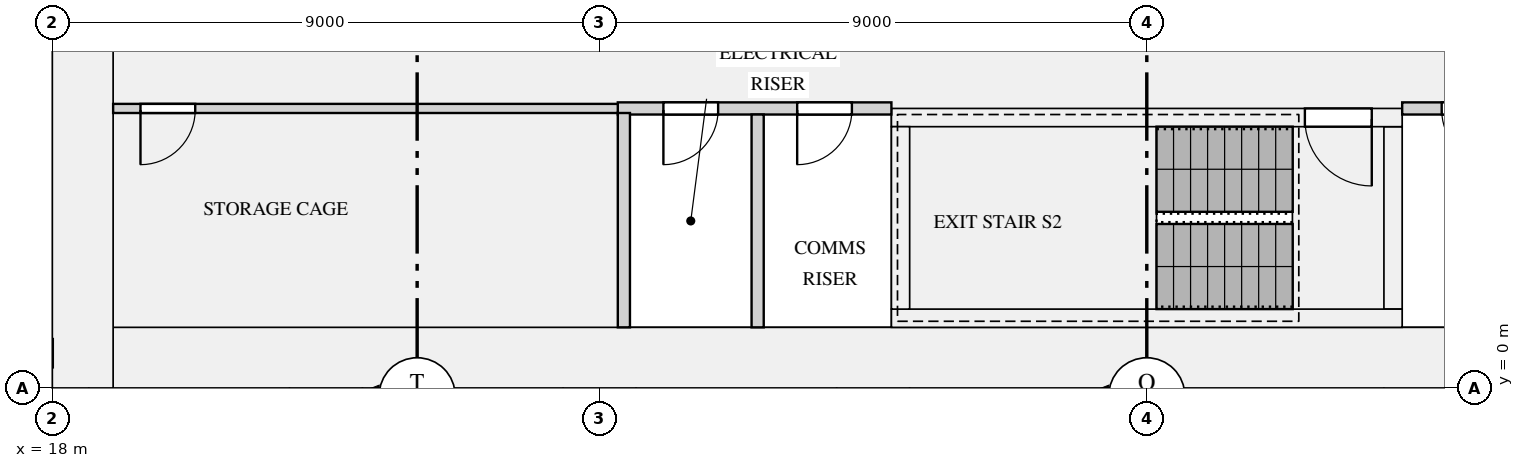
"""IFC4 building model, lengths in metres.
Left out: names, types, materials, properties, quantities, classifications, styles, units other than length and angle.
Written with IfcOpenShell. Run it as: python <this file> out.ifc"""

import sys

from ifc_helpers import new_model, si_unit, direction, frame, frame_2d, origin, place, context, subcontext, project, spatial, rectangle, extrude, element, fill, save


model = new_model("IFC4")
c1 = context("Model", 3, precision=1e-05, world=origin(), true_north=direction((0.0, 1.0)))
c2 = subcontext(c1, "Body", "Model", "MODEL_VIEW")
j1 = project(units=[si_unit("LENGTHUNIT", "METRE"), si_unit("PLANEANGLEUNIT", "RADIAN")], contexts=[c1])
p1 = place(None, origin())
s1 = spatial("IfcSite", under=j1, at=p1, CompositionType="ELEMENT")
p2 = place(p1, origin())
s2 = spatial("IfcBuilding", under=s1, at=p2, CompositionType="ELEMENT")
p3 = place(p2, frame((0.0, 0.0, 60.45)))
s3 = spatial("IfcBuildingStorey", under=s2, at=p3, CompositionType="ELEMENT", Elevation=60.45)
p4 = place(p3, frame((18.5, 0.0, 0.0), z_axis=(0.0, 0.0, 1.0), x_axis=(0.0, 1.0, 0.0)))
e1 = element("IfcWall", 1, at=p4, inside=s3, PredefinedType="SHEAR", context=c2, shape_type="SweptSolid", body=[
    extrude(rectangle(XDim=12.5, YDim=1.0, at=frame_2d((6.25, 0.0))), origin(), (0.0, 0.0, 1.0), 3.15),
])
p5 = place(p3, frame((19.0, 0.5, 0.0), z_axis=(0.0, 0.0, 1.0), x_axis=(1.0, 0.0, 0.0)))
e2 = element("IfcWall", 2, at=p5, inside=s3, PredefinedType="SHEAR", context=c2, shape_type="SweptSolid", body=[
    extrude(rectangle(XDim=34.0, YDim=1.0, at=frame_2d((17.0, 0.0))), origin(), (0.0, 0.0, 1.0), 3.15),
])
p6 = place(p3, frame((31.8, 1.15, 0.0), z_axis=(0.0, 0.0, 1.0), x_axis=(1.0, 0.0, 0.0)))
e3 = element("IfcWall", 3, at=p6, inside=s3, PredefinedType="SHEAR", context=c2, shape_type="SweptSolid", body=[
    extrude(rectangle(XDim=8.4, YDim=0.3, at=frame_2d((4.2, 0.0))), origin(), (0.0, 0.0, 1.0), 3.15),
])
p7 = place(p3, frame((31.8, 4.45, 0.0), z_axis=(0.0, 0.0, 1.0), x_axis=(1.0, 0.0, 0.0)))
e4 = element("IfcWall", 4, at=p7, inside=s3, PredefinedType="SHEAR", context=c2, shape_type="SweptSolid", body=[
    extrude(rectangle(XDim=8.4, YDim=0.3, at=frame_2d((4.2, 0.0))), origin(), (0.0, 0.0, 1.0), 3.15),
])
p8 = place(p7, frame((6.8, 0.0, 0.0)))
e5 = element("IfcOpeningElement", 5, at=p8, cuts=e4, PredefinedType="OPENING", context=c2, shape_type="SweptSolid", body=[
    extrude(rectangle(XDim=1.1, YDim=2.1, at=frame_2d((0.55, 1.05))), frame((0.0, 0.16, 0.0), z_axis=(0.0, -1.0, 0.0), x_axis=(1.0, 0.0, 0.0)), (0.0, 0.0, 1.0), 0.32),
])
for number, where, z_axis, x_axis in (
    (6, (31.95, 1.3, 0.0), (0.0, 0.0, 1.0), (0.0, 1.0, 0.0)),
    (7, (40.05, 1.3, 0.0), (0.0, 0.0, 1.0), (0.0, 1.0, 0.0)),
):
    element("IfcWall", number, at=place(p3, frame(where, z_axis=z_axis, x_axis=x_axis)), inside=s3, PredefinedType="SHEAR", context=c2, shape_type="SweptSolid", body=[
        extrude(rectangle(XDim=3.0, YDim=0.3, at=frame_2d((1.5, 0.0))), origin(), (0.0, 0.0, 1.0), 3.15),
    ])
p9 = place(p3, frame((27.3, 4.6, 0.0), z_axis=(0.0, 0.0, 1.0), x_axis=(1.0, 0.0, 0.0)))
e8 = element("IfcWall", 8, at=p9, inside=s3, PredefinedType="PARTITIONING", context=c2, shape_type="SweptSolid", body=[
    extrude(rectangle(XDim=4.5, YDim=0.2, at=frame_2d((2.25, 0.0))), origin(), (0.0, 0.0, 1.0), 2.83),
])
p10 = place(p9, frame((0.75, 0.0, 0.0)))
e9 = element("IfcOpeningElement", 9, at=p10, cuts=e8, PredefinedType="OPENING", context=c2, shape_type="SweptSolid", body=[
    extrude(rectangle(XDim=0.9, YDim=2.1, at=frame_2d((0.45, 1.05))), frame((0.0, 0.11, 0.0), z_axis=(0.0, -1.0, 0.0), x_axis=(1.0, 0.0, 0.0)), (0.0, 0.0, 1.0), 0.22),
])
p11 = place(p9, frame((2.95, 0.0, 0.0)))
e10 = element("IfcOpeningElement", 10, at=p11, cuts=e8, PredefinedType="OPENING", context=c2, shape_type="SweptSolid", body=[
    extrude(rectangle(XDim=0.9, YDim=2.1, at=frame_2d((0.45, 1.05))), frame((0.0, 0.11, 0.0), z_axis=(0.0, -1.0, 0.0), x_axis=(1.0, 0.0, 0.0)), (0.0, 0.0, 1.0), 0.22),
])
p12 = place(p3, frame((40.2, 4.6, 0.0), z_axis=(0.0, 0.0, 1.0), x_axis=(1.0, 0.0, 0.0)))
e11 = element("IfcWall", 11, at=p12, inside=s3, PredefinedType="PARTITIONING", context=c2, shape_type="SweptSolid", body=[
    extrude(rectangle(XDim=4.5, YDim=0.2, at=frame_2d((2.25, 0.0))), origin(), (0.0, 0.0, 1.0), 2.83),
])
p13 = place(p12, frame((0.65, 0.0, 0.0)))
e12 = element("IfcOpeningElement", 12, at=p13, cuts=e11, PredefinedType="OPENING", context=c2, shape_type="SweptSolid", body=[
    extrude(rectangle(XDim=0.9, YDim=2.1, at=frame_2d((0.45, 1.05))), frame((0.0, 0.11, 0.0), z_axis=(0.0, -1.0, 0.0), x_axis=(1.0, 0.0, 0.0)), (0.0, 0.0, 1.0), 0.22),
])
p14 = place(p12, frame((2.85, 0.0, 0.0)))
e13 = element("IfcOpeningElement", 13, at=p14, cuts=e11, PredefinedType="OPENING", context=c2, shape_type="SweptSolid", body=[
    extrude(rectangle(XDim=0.9, YDim=2.1, at=frame_2d((0.45, 1.05))), frame((0.0, 0.11, 0.0), z_axis=(0.0, -1.0, 0.0), x_axis=(1.0, 0.0, 0.0)), (0.0, 0.0, 1.0), 0.22),
])
p15 = place(p3, frame((19.0, 4.6, 0.0), z_axis=(0.0, 0.0, 1.0), x_axis=(1.0, 0.0, 0.0)))
e14 = element("IfcWall", 14, at=p15, inside=s3, PredefinedType="PARTITIONING", context=c2, shape_type="SweptSolid", body=[
    extrude(rectangle(XDim=8.3, YDim=0.15, at=frame_2d((4.15, 0.0))), origin(), (0.0, 0.0, 1.0), 2.83),
])
p16 = place(p15, frame((0.45, 0.0, 0.0)))
e15 = element("IfcOpeningElement", 15, at=p16, cuts=e14, PredefinedType="OPENING", context=c2, shape_type="SweptSolid", body=[
    extrude(rectangle(XDim=0.9, YDim=2.1, at=frame_2d((0.45, 1.05))), frame((0.0, 0.085, 0.0), z_axis=(0.0, -1.0, 0.0), x_axis=(1.0, 0.0, 0.0)), (0.0, 0.0, 1.0), 0.17),
])
p17 = place(p3, frame((27.4, 1.0, 0.0), z_axis=(0.0, 0.0, 1.0), x_axis=(0.0, 1.0, 0.0)))
e16 = element("IfcWall", 16, at=p17, inside=s3, PredefinedType="PARTITIONING", context=c2, shape_type="SweptSolid", body=[
    extrude(rectangle(XDim=3.525, YDim=0.2, at=frame_2d((1.762, 0.0))), origin(), (0.0, 0.0, 1.0), 2.83),
])
p18 = place(p3, frame((29.6, 1.0, 0.0), z_axis=(0.0, 0.0, 1.0), x_axis=(0.0, 1.0, 0.0)))
e17 = element("IfcWall", 17, at=p18, inside=s3, PredefinedType="PARTITIONING", context=c2, shape_type="SweptSolid", body=[
    extrude(rectangle(XDim=3.5, YDim=0.2, at=frame_2d((1.75, 0.0))), origin(), (0.0, 0.0, 1.0), 2.83),
])
p19 = place(p8, frame((1.1, 0.0, 0.0), z_axis=(0.0, 0.0, 1.0), x_axis=(-1.0, 0.0, 0.0)))
e18 = element("IfcDoor", 18, at=p19, inside=s3, OperationType="SINGLE_SWING_LEFT", PredefinedType="DOOR", context=c2, shape_type="SweptSolid", body=[
    extrude(rectangle(XDim=1.1, YDim=2.1, at=frame_2d((0.55, 1.05))), frame((0.0, 0.025, 0.0), z_axis=(0.0, -1.0, 0.0), x_axis=(1.0, 0.0, 0.0)), (0.0, 0.0, 1.0), 0.05),
])
fill(e5, e18)
p20 = place(p16, frame((0.9, 0.0, 0.0), z_axis=(0.0, 0.0, 1.0), x_axis=(-1.0, 0.0, 0.0)))
e19 = element("IfcDoor", 19, at=p20, inside=s3, OperationType="SINGLE_SWING_RIGHT", PredefinedType="DOOR", context=c2, shape_type="SweptSolid", body=[
    extrude(rectangle(XDim=0.9, YDim=2.1, at=frame_2d((0.45, 1.05))), frame((0.0, 0.025, 0.0), z_axis=(0.0, -1.0, 0.0), x_axis=(1.0, 0.0, 0.0)), (0.0, 0.0, 1.0), 0.05),
])
fill(e15, e19)
p21 = place(p10, frame((0.9, 0.0, 0.0), z_axis=(0.0, 0.0, 1.0), x_axis=(-1.0, 0.0, 0.0)))
e20 = element("IfcDoor", 20, at=p21, inside=s3, OperationType="SINGLE_SWING_RIGHT", PredefinedType="DOOR", context=c2, shape_type="SweptSolid", body=[
    extrude(rectangle(XDim=0.9, YDim=2.1, at=frame_2d((0.45, 1.05))), frame((0.0, 0.025, 0.0), z_axis=(0.0, -1.0, 0.0), x_axis=(1.0, 0.0, 0.0)), (0.0, 0.0, 1.0), 0.05),
])
fill(e9, e20)
p22 = place(p11, frame((0.9, 0.0, 0.0), z_axis=(0.0, 0.0, 1.0), x_axis=(-1.0, 0.0, 0.0)))
e21 = element("IfcDoor", 21, at=p22, inside=s3, OperationType="SINGLE_SWING_RIGHT", PredefinedType="DOOR", context=c2, shape_type="SweptSolid", body=[
    extrude(rectangle(XDim=0.9, YDim=2.1, at=frame_2d((0.45, 1.05))), frame((0.0, 0.025, 0.0), z_axis=(0.0, -1.0, 0.0), x_axis=(1.0, 0.0, 0.0)), (0.0, 0.0, 1.0), 0.05),
])
fill(e10, e21)
p23 = place(p13, frame((0.9, 0.0, 0.0), z_axis=(0.0, 0.0, 1.0), x_axis=(-1.0, 0.0, 0.0)))
e22 = element("IfcDoor", 22, at=p23, inside=s3, OperationType="SINGLE_SWING_LEFT", PredefinedType="DOOR", context=c2, shape_type="SweptSolid", body=[
    extrude(rectangle(XDim=0.9, YDim=2.1, at=frame_2d((0.45, 1.05))), frame((0.0, 0.025, 0.0), z_axis=(0.0, -1.0, 0.0), x_axis=(1.0, 0.0, 0.0)), (0.0, 0.0, 1.0), 0.05),
])
fill(e12, e22)
save(model, sys.argv[1])
